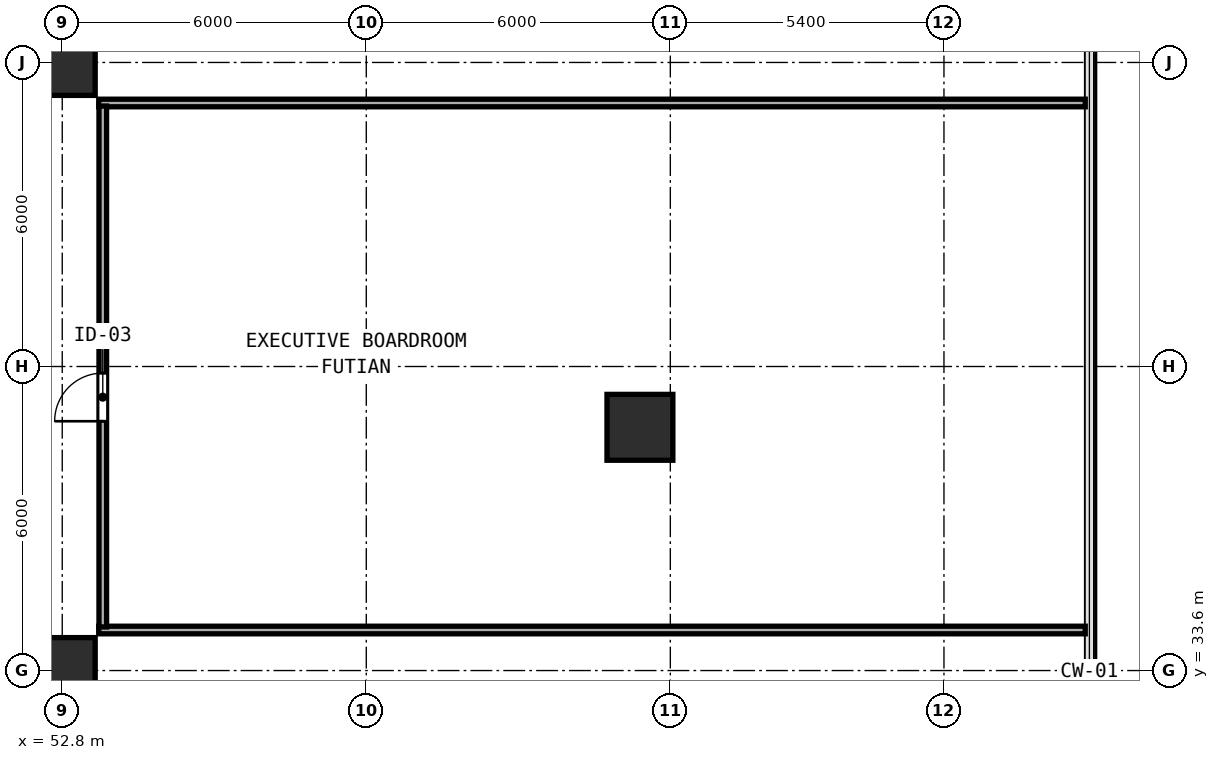
"""IFC4 building model, lengths in metres.
Left out: names, types, materials, properties, quantities, classifications, styles, units other than length and angle.
Written with IfcOpenShell. Run it as: python <this file> out.ifc"""

import sys

from ifc_helpers import new_model, si_unit, direction, frame, frame_2d, origin, origin_2d, place, context, subcontext, project, spatial, rectangle, hollow_rectangle, extrude, element, fill, save


model = new_model("IFC4")
c1 = context("Model", 3, precision=1e-05, world=origin(), true_north=direction((0.0, 1.0)))
c2 = subcontext(c1, "Body", "Model", "MODEL_VIEW")
j1 = project(units=[si_unit("LENGTHUNIT", "METRE"), si_unit("PLANEANGLEUNIT", "RADIAN")], contexts=[c1])
p1 = place(None, origin())
s1 = spatial("IfcSite", under=j1, at=p1, CompositionType="ELEMENT")
p2 = place(p1, origin())
s2 = spatial("IfcBuilding", under=s1, at=p2, CompositionType="ELEMENT")
p3 = place(p2, frame((0.0, 0.0, 15.6)))
s3 = spatial("IfcBuildingStorey", under=s2, at=p3, CompositionType="ELEMENT", Elevation=15.6)
for number, where, z_axis, x_axis in (
    (1, (52.8, 33.6, 0.0), (0.0, 0.0, 1.0), (1.0, 0.0, 0.0)),
    (2, (52.8, 45.6, 0.0), (0.0, 0.0, 1.0), (1.0, 0.0, 0.0)),
    (3, (64.2, 38.4, 0.0), (0.0, 0.0, 1.0), (1.0, 0.0, 0.0)),
):
    element("IfcColumn", number, at=place(p3, frame(where, z_axis=z_axis, x_axis=x_axis)), inside=s3, PredefinedType="COLUMN", context=c2, shape_type="SweptSolid", body=[
        extrude(hollow_rectangle(XDim=1.3, YDim=1.3, WallThickness=0.048, at=origin_2d()), origin(), (0.0, 0.0, 1.0), 4.2),
    ])
for number, where, z_axis, x_axis in (
    (4, (53.52, 44.8, 0.0), (0.0, 0.0, 1.0), (1.0, 0.0, 0.0)),
    (5, (53.52, 34.4, 0.0), (0.0, 0.0, 1.0), (1.0, 0.0, 0.0)),
):
    element("IfcWall", number, at=place(p3, frame(where, z_axis=z_axis, x_axis=x_axis)), inside=s3, PredefinedType="PARTITIONING", context=c2, shape_type="SweptSolid", body=[
        extrude(rectangle(XDim=19.468, YDim=0.15, at=frame_2d((9.734, 0.0))), origin(), (0.0, 0.0, 1.0), 3.78),
    ])
p4 = place(p3, frame((53.6, 34.46, 0.0), z_axis=(0.0, 0.0, 1.0), x_axis=(0.0, 1.0, 0.0)))
e6 = element("IfcWall", 6, at=p4, inside=s3, PredefinedType="PARTITIONING", context=c2, shape_type="SweptSolid", body=[
    extrude(rectangle(XDim=10.28, YDim=0.15, at=frame_2d((5.14, 0.0))), origin(), (0.0, 0.0, 1.0), 3.78),
])
p5 = place(p4, frame((4.06, 0.0, 0.0)))
e7 = element("IfcOpeningElement", 7, at=p5, cuts=e6, PredefinedType="OPENING", context=c2, shape_type="SweptSolid", body=[
    extrude(rectangle(XDim=0.95, YDim=2.12, at=frame_2d((0.475, 1.06))), frame((0.0, 0.085, 0.0), z_axis=(0.0, -1.0, 0.0), x_axis=(1.0, 0.0, 0.0)), (0.0, 0.0, 1.0), 0.17),
])
p6 = place(p5, origin())
e8 = element("IfcDoor", 8, at=p6, inside=s3, OperationType="SINGLE_SWING_LEFT", PredefinedType="DOOR", context=c2, shape_type="SweptSolid", body=[
    extrude(rectangle(XDim=0.95, YDim=2.12, at=frame_2d((0.475, 1.06))), frame((0.0, 0.025, 0.0), z_axis=(0.0, -1.0, 0.0), x_axis=(1.0, 0.0, 0.0)), (0.0, 0.0, 1.0), 0.05),
])
fill(e7, e8)
save(model, sys.argv[1])
